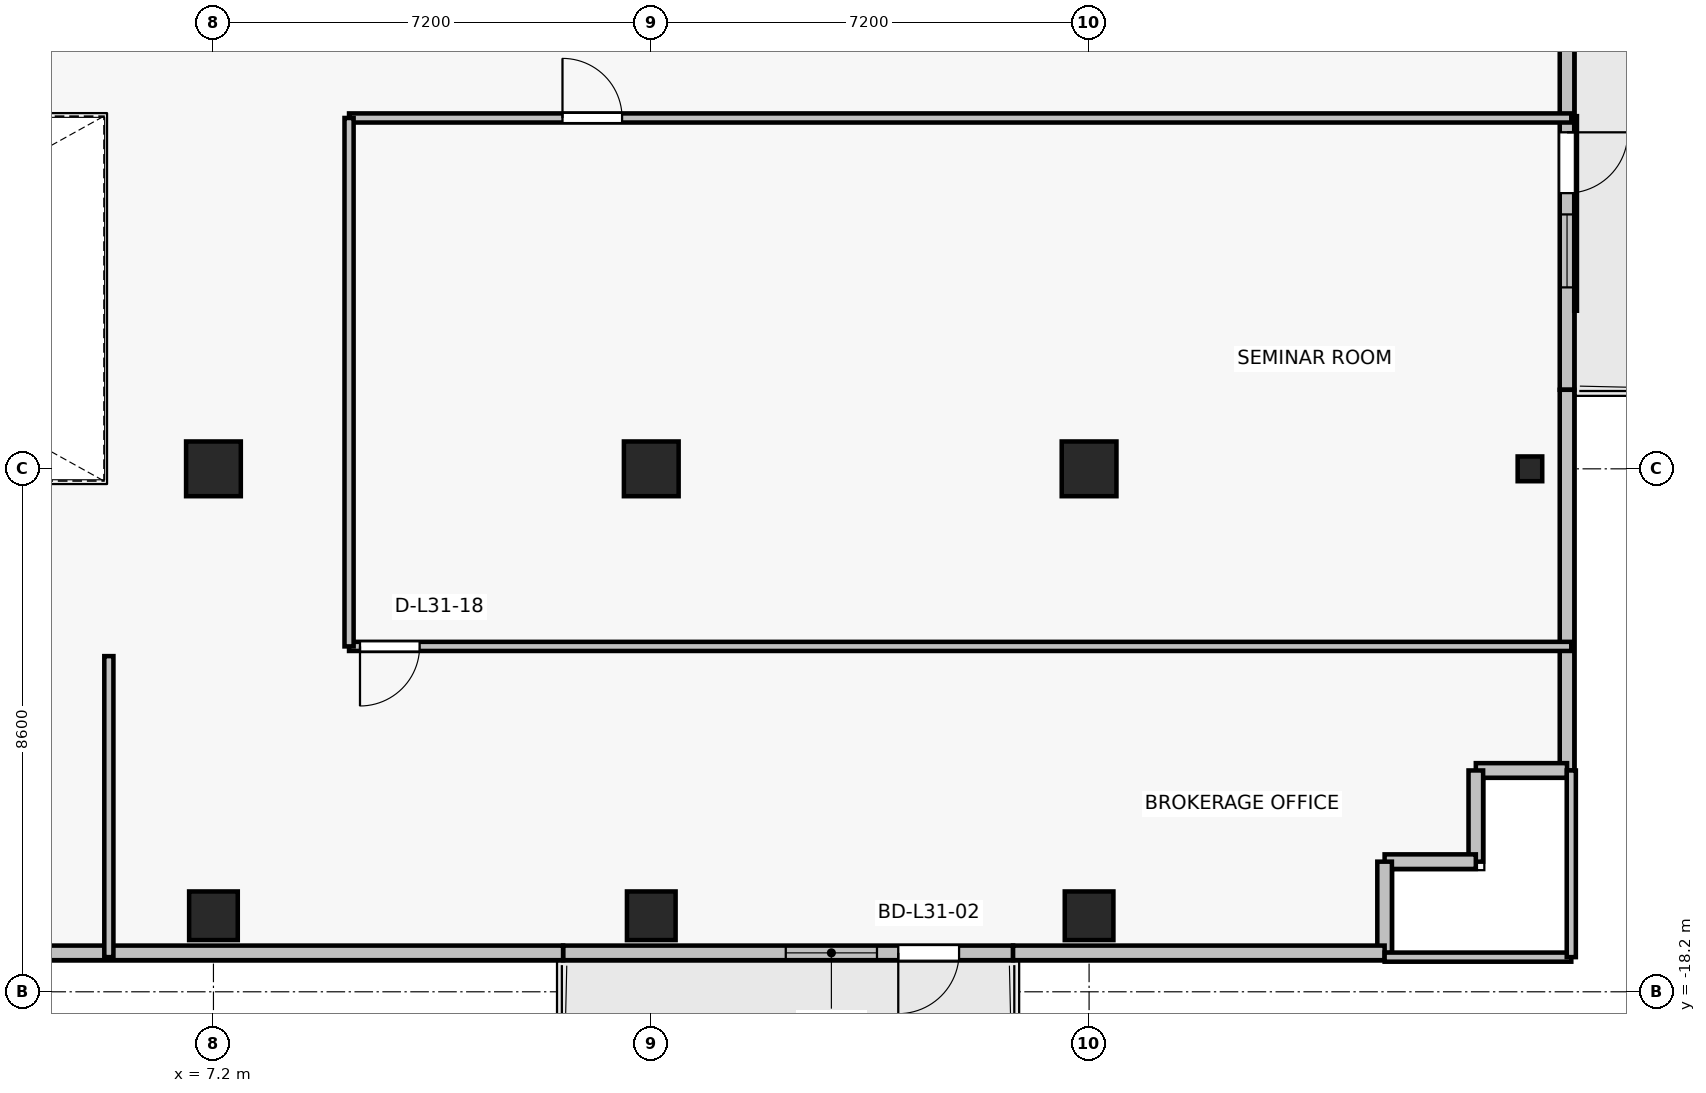
"""IFC4 building model, lengths in metres.
Left out: names, types, materials, properties, quantities, classifications, styles, units other than length and angle.
Written with IfcOpenShell. Run it as: python <this file> out.ifc"""

import sys

from ifc_helpers import new_model, si_unit, direction, frame, frame_2d, origin, origin_2d, place, context, subcontext, project, spatial, rectangle, i_section, extrude, source, transform, mapped, element, fill, save


model = new_model("IFC4")
c1 = context("Model", 3, precision=1e-05, world=origin(), true_north=direction((0.0, 1.0)))
c2 = subcontext(c1, "Body", "Model", "MODEL_VIEW")
j1 = project(units=[si_unit("LENGTHUNIT", "METRE"), si_unit("PLANEANGLEUNIT", "RADIAN")], contexts=[c1])
p1 = place(None, origin())
s1 = spatial("IfcSite", under=j1, at=p1, CompositionType="ELEMENT")
p2 = place(p1, origin())
s2 = spatial("IfcBuilding", under=s1, at=p2, CompositionType="ELEMENT")
p3 = place(p2, frame((0.0, 0.0, 113.2)))
s3 = spatial("IfcBuildingStorey", under=s2, at=p3, CompositionType="ELEMENT", Elevation=113.2)
for number, where, z_axis, x_axis in (
    (1, (7.2, -9.6, 0.0), (0.0, 0.0, 1.0), (1.0, 0.0, 0.0)),
    (2, (14.4, -9.6, 0.0), (0.0, 0.0, 1.0), (1.0, 0.0, 0.0)),
    (3, (21.6, -9.6, 0.0), (0.0, 0.0, 1.0), (1.0, 0.0, 0.0)),
):
    element("IfcColumn", number, at=place(p3, frame(where, z_axis=z_axis, x_axis=x_axis)), inside=s3, PredefinedType="COLUMN", context=c2, shape_type="SweptSolid", body=[
        extrude(rectangle(XDim=0.9, YDim=0.9, at=origin_2d()), origin(), (0.0, 0.0, 1.0), 3.3),
    ])
for number, where, z_axis, x_axis in (
    (4, (7.2, -16.95, 0.0), (0.0, 0.0, 1.0), (1.0, 0.0, 0.0)),
    (5, (14.4, -16.95, 0.0), (0.0, 0.0, 1.0), (1.0, 0.0, 0.0)),
    (6, (21.6, -16.95, 0.0), (0.0, 0.0, 1.0), (1.0, 0.0, 0.0)),
):
    element("IfcColumn", number, at=place(p3, frame(where, z_axis=z_axis, x_axis=x_axis)), inside=s3, PredefinedType="COLUMN", context=c2, shape_type="SweptSolid", body=[
        extrude(rectangle(XDim=0.8, YDim=0.8, at=origin_2d()), origin(), (0.0, 0.0, 1.0), 3.3),
    ])
p4 = place(p3, frame((28.85, -9.6, 0.0), z_axis=(0.0, 0.0, 1.0), x_axis=(1.0, 0.0, 0.0)))
e7 = element("IfcColumn", 7, at=p4, inside=s3, PredefinedType="COLUMN", context=c2, shape_type="SweptSolid", body=[
    extrude(i_section(OverallWidth=0.404, OverallDepth=0.407, WebThickness=0.022, FlangeThickness=0.032, FilletRadius=0.015, at=origin_2d()), origin(), (0.0, 0.0, 1.0), 3.3),
])
p5 = place(p3, frame((20.35, -17.56, 0.0), z_axis=(0.0, 0.0, 1.0), x_axis=(-1.0, 0.0, 0.0)))
e8 = element("IfcWall", 8, at=p5, inside=s3, PredefinedType="SOLIDWALL", context=c2, shape_type="SweptSolid", body=[
    extrude(rectangle(XDim=7.4, YDim=0.24, at=frame_2d((3.7, 0.0))), origin(), (0.0, 0.0, 1.0), 2.665),
])
p6 = place(p5, frame((0.888, 0.0, 0.0)))
e9 = element("IfcOpeningElement", 9, at=p6, cuts=e8, PredefinedType="OPENING", context=c2, shape_type="SweptSolid", body=[
    extrude(rectangle(XDim=1.0, YDim=2.2, at=frame_2d((0.5, 1.1))), frame((0.0, 0.13, 0.0), z_axis=(0.0, -1.0, 0.0), x_axis=(1.0, 0.0, 0.0)), (0.0, 0.0, 1.0), 0.26),
])
p7 = place(p5, frame((2.238, 0.0, 0.85)))
e10 = element("IfcOpeningElement", 10, at=p7, cuts=e8, PredefinedType="OPENING", context=c2, shape_type="SweptSolid", body=[
    extrude(rectangle(XDim=1.5, YDim=1.6, at=frame_2d((0.75, 0.8))), frame((0.0, 0.13, 0.0), z_axis=(0.0, -1.0, 0.0), x_axis=(1.0, 0.0, 0.0)), (0.0, 0.0, 1.0), 0.26),
])
p8 = place(p3, frame((29.46, -2.5, 0.0), z_axis=(0.0, 0.0, 1.0), x_axis=(0.0, -1.0, 0.0)))
e11 = element("IfcWall", 11, at=p8, inside=s3, PredefinedType="SOLIDWALL", context=c2, shape_type="SweptSolid", body=[
    extrude(rectangle(XDim=5.8, YDim=0.24, at=frame_2d((2.9, 0.0))), origin(), (0.0, 0.0, 1.0), 3.075),
])
p9 = place(p8, frame((1.566, 0.0, 0.0)))
e12 = element("IfcOpeningElement", 12, at=p9, cuts=e11, PredefinedType="OPENING", context=c2, shape_type="SweptSolid", body=[
    extrude(rectangle(XDim=1.0, YDim=2.2, at=frame_2d((0.5, 1.1))), frame((0.0, 0.13, 0.0), z_axis=(0.0, -1.0, 0.0), x_axis=(1.0, 0.0, 0.0)), (0.0, 0.0, 1.0), 0.26),
])
p10 = place(p8, frame((2.916, 0.0, 0.85)))
e13 = element("IfcOpeningElement", 13, at=p10, cuts=e11, PredefinedType="OPENING", context=c2, shape_type="SweptSolid", body=[
    extrude(rectangle(XDim=1.2, YDim=1.5, at=frame_2d((0.6, 0.75))), frame((0.0, 0.13, 0.0), z_axis=(0.0, -1.0, 0.0), x_axis=(1.0, 0.0, 0.0)), (0.0, 0.0, 1.0), 0.26),
])
p11 = place(p3, frame((29.46, -14.56, 0.0), z_axis=(0.0, 0.0, 1.0), x_axis=(0.0, 1.0, 0.0)))
e14 = element("IfcWall", 14, at=p11, inside=s3, PredefinedType="SOLIDWALL", context=c2, shape_type="SweptSolid", body=[
    extrude(rectangle(XDim=6.26, YDim=0.24, at=frame_2d((3.13, 0.0))), origin(), (0.0, 0.0, 1.0), 3.075),
])
for number, where, z_axis, x_axis in (
    (15, (27.96, -14.56, 0.0), (0.0, 0.0, 1.0), (1.0, 0.0, 0.0)),
    (16, (27.96, -16.06, 0.0), (0.0, 0.0, 1.0), (0.0, 1.0, 0.0)),
    (17, (26.46, -16.06, 0.0), (0.0, 0.0, 1.0), (1.0, 0.0, 0.0)),
    (18, (26.46, -17.56, 0.0), (0.0, 0.0, 1.0), (0.0, 1.0, 0.0)),
):
    element("IfcWall", number, at=place(p3, frame(where, z_axis=z_axis, x_axis=x_axis)), inside=s3, PredefinedType="SOLIDWALL", context=c2, shape_type="SweptSolid", body=[
        extrude(rectangle(XDim=1.5, YDim=0.24, at=frame_2d((0.75, 0.0))), origin(), (0.0, 0.0, 1.0), 3.075),
    ])
p12 = place(p3, frame((20.35, -17.56, 0.0), z_axis=(0.0, 0.0, 1.0), x_axis=(1.0, 0.0, 0.0)))
e19 = element("IfcWall", 19, at=p12, inside=s3, PredefinedType="SOLIDWALL", context=c2, shape_type="SweptSolid", body=[
    extrude(rectangle(XDim=6.11, YDim=0.24, at=frame_2d((3.055, 0.0))), origin(), (0.0, 0.0, 1.0), 3.075),
])
p13 = place(p3, frame((3.34, -17.56, 0.0), z_axis=(0.0, 0.0, 1.0), x_axis=(1.0, 0.0, 0.0)))
e20 = element("IfcWall", 20, at=p13, inside=s3, PredefinedType="SOLIDWALL", context=c2, shape_type="SweptSolid", body=[
    extrude(rectangle(XDim=9.61, YDim=0.24, at=frame_2d((4.805, 0.0))), origin(), (0.0, 0.0, 1.0), 2.665),
])
p14 = place(p3, frame((29.53, -12.52, 0.0), z_axis=(0.0, 0.0, 1.0), x_axis=(-1.0, 0.0, 0.0)))
e21 = element("IfcWall", 21, at=p14, inside=s3, PredefinedType="PARTITIONING", context=c2, shape_type="SweptSolid", body=[
    extrude(rectangle(XDim=20.1, YDim=0.15, at=frame_2d((10.05, 0.0))), origin(), (0.0, 0.0, 1.0), 2.515),
])
p15 = place(p14, frame((18.94, 0.0, 0.0)))
e22 = element("IfcOpeningElement", 22, at=p15, cuts=e21, PredefinedType="OPENING", context=c2, shape_type="SweptSolid", body=[
    extrude(rectangle(XDim=0.98, YDim=2.15, at=frame_2d((0.49, 1.075))), frame((0.0, 0.085, 0.0), z_axis=(0.0, -1.0, 0.0), x_axis=(1.0, 0.0, 0.0)), (0.0, 0.0, 1.0), 0.17),
])
p16 = place(p3, frame((9.43, -3.83, 0.0), z_axis=(0.0, 0.0, 1.0), x_axis=(1.0, 0.0, 0.0)))
e23 = element("IfcWall", 23, at=p16, inside=s3, PredefinedType="PARTITIONING", context=c2, shape_type="SweptSolid", body=[
    extrude(rectangle(XDim=20.1, YDim=0.15, at=frame_2d((10.05, 0.0))), origin(), (0.0, 0.0, 1.0), 2.515),
])
p17 = place(p16, frame((3.51, 0.0, 0.0)))
e24 = element("IfcOpeningElement", 24, at=p17, cuts=e23, PredefinedType="OPENING", context=c2, shape_type="SweptSolid", body=[
    extrude(rectangle(XDim=0.98, YDim=2.15, at=frame_2d((0.49, 1.075))), frame((0.0, 0.085, 0.0), z_axis=(0.0, -1.0, 0.0), x_axis=(1.0, 0.0, 0.0)), (0.0, 0.0, 1.0), 0.17),
])
p18 = place(p3, frame((9.43, -12.52, 0.0), z_axis=(0.0, 0.0, 1.0), x_axis=(0.0, 1.0, 0.0)))
e25 = element("IfcWall", 25, at=p18, inside=s3, PredefinedType="PARTITIONING", context=c2, shape_type="SweptSolid", body=[
    extrude(rectangle(XDim=8.69, YDim=0.15, at=frame_2d((4.345, 0.0))), origin(), (0.0, 0.0, 1.0), 2.515),
])
p19 = place(p3, frame((29.53, -17.63, 0.0), z_axis=(0.0, 0.0, 1.0), x_axis=(-1.0, 0.0, 0.0)))
e26 = element("IfcWall", 26, at=p19, inside=s3, PredefinedType="PARTITIONING", context=c2, shape_type="SweptSolid", body=[
    extrude(rectangle(XDim=3.07, YDim=0.15, at=frame_2d((1.535, 0.0))), origin(), (0.0, 0.0, 1.0), 2.665),
])
p20 = place(p3, frame((5.48, -17.63, 0.0), z_axis=(0.0, 0.0, 1.0), x_axis=(0.0, 1.0, 0.0)))
e27 = element("IfcWall", 27, at=p20, inside=s3, PredefinedType="PARTITIONING", context=c2, shape_type="SweptSolid", body=[
    extrude(rectangle(XDim=4.95, YDim=0.15, at=frame_2d((2.475, 0.0))), origin(), (0.0, 0.0, 1.0), 2.565),
])
p21 = place(p3, frame((29.53, -14.56, 0.0), z_axis=(0.0, 0.0, 1.0), x_axis=(0.0, -1.0, 0.0)))
e28 = element("IfcWall", 28, at=p21, inside=s3, PredefinedType="PARTITIONING", context=c2, shape_type="SweptSolid", body=[
    extrude(rectangle(XDim=3.07, YDim=0.15, at=frame_2d((1.535, 0.0))), origin(), (0.0, 0.0, 1.0), 3.075),
])
m1 = source(origin(), c2, "Body", "SweptSolid", [
    extrude(rectangle(XDim=1.0, YDim=2.2, at=frame_2d((0.5, 1.1))), frame((0.0, 0.025, 0.0), z_axis=(0.0, -1.0, 0.0), x_axis=(1.0, 0.0, 0.0)), (0.0, 0.0, 1.0), 0.05),
])
p22 = place(p6, origin())
e29 = element("IfcDoor", 29, at=p22, inside=s3, OperationType="SINGLE_SWING_RIGHT", PredefinedType="DOOR", context=c2, shape_type="MappedRepresentation", body=[
    mapped(m1, transform((0.0, 0.0, 0.0), x_axis=(1.0, 0.0, 0.0), y_axis=(0.0, 1.0, 0.0), z_axis=(0.0, 0.0, 1.0), scale=1.0)),
])
fill(e9, e29)
m2 = source(origin(), c2, "Body", "SweptSolid", [
    extrude(rectangle(XDim=1.5, YDim=1.6, at=frame_2d((0.75, 0.8))), frame((0.0, 0.03, 0.0), z_axis=(0.0, -1.0, 0.0), x_axis=(1.0, 0.0, 0.0)), (0.0, 0.0, 1.0), 0.06),
])
p23 = place(p7, origin())
e30 = element("IfcWindow", 30, at=p23, inside=s3, PartitioningType="SINGLE_PANEL", PredefinedType="WINDOW", context=c2, shape_type="MappedRepresentation", body=[
    mapped(m2, transform((0.0, 0.0, 0.0), x_axis=(1.0, 0.0, 0.0), y_axis=(0.0, 1.0, 0.0), z_axis=(0.0, 0.0, 1.0), scale=1.0)),
])
fill(e10, e30)
p24 = place(p9, origin())
e31 = element("IfcDoor", 31, at=p24, inside=s3, OperationType="SINGLE_SWING_LEFT", PredefinedType="DOOR", context=c2, shape_type="MappedRepresentation", body=[
    mapped(m1, transform((0.0, 0.0, 0.0), x_axis=(1.0, 0.0, 0.0), y_axis=(0.0, 1.0, 0.0), z_axis=(0.0, 0.0, 1.0), scale=1.0)),
])
fill(e12, e31)
m3 = source(origin(), c2, "Body", "SweptSolid", [
    extrude(rectangle(XDim=1.2, YDim=1.5, at=frame_2d((0.6, 0.75))), frame((0.0, 0.03, 0.0), z_axis=(0.0, -1.0, 0.0), x_axis=(1.0, 0.0, 0.0)), (0.0, 0.0, 1.0), 0.06),
])
p25 = place(p10, origin())
e32 = element("IfcWindow", 32, at=p25, inside=s3, PartitioningType="SINGLE_PANEL", PredefinedType="WINDOW", context=c2, shape_type="MappedRepresentation", body=[
    mapped(m3, transform((0.0, 0.0, 0.0), x_axis=(1.0, 0.0, 0.0), y_axis=(0.0, 1.0, 0.0), z_axis=(0.0, 0.0, 1.0), scale=1.0)),
])
fill(e13, e32)
m4 = source(origin(), c2, "Body", "SweptSolid", [
    extrude(rectangle(XDim=0.98, YDim=2.15, at=frame_2d((0.49, 1.075))), frame((0.0, 0.025, 0.0), z_axis=(0.0, -1.0, 0.0), x_axis=(1.0, 0.0, 0.0)), (0.0, 0.0, 1.0), 0.05),
])
p26 = place(p17, origin())
e33 = element("IfcDoor", 33, at=p26, inside=s3, OperationType="SINGLE_SWING_LEFT", PredefinedType="DOOR", context=c2, shape_type="MappedRepresentation", body=[
    mapped(m4, transform((0.0, 0.0, 0.0), x_axis=(1.0, 0.0, 0.0), y_axis=(0.0, 1.0, 0.0), z_axis=(0.0, 0.0, 1.0), scale=1.0)),
])
fill(e24, e33)
p27 = place(p15, origin())
e34 = element("IfcDoor", 34, at=p27, inside=s3, OperationType="SINGLE_SWING_RIGHT", PredefinedType="DOOR", context=c2, shape_type="MappedRepresentation", body=[
    mapped(m4, transform((0.0, 0.0, 0.0), x_axis=(1.0, 0.0, 0.0), y_axis=(0.0, 1.0, 0.0), z_axis=(0.0, 0.0, 1.0), scale=1.0)),
])
fill(e22, e34)
save(model, sys.argv[1])
